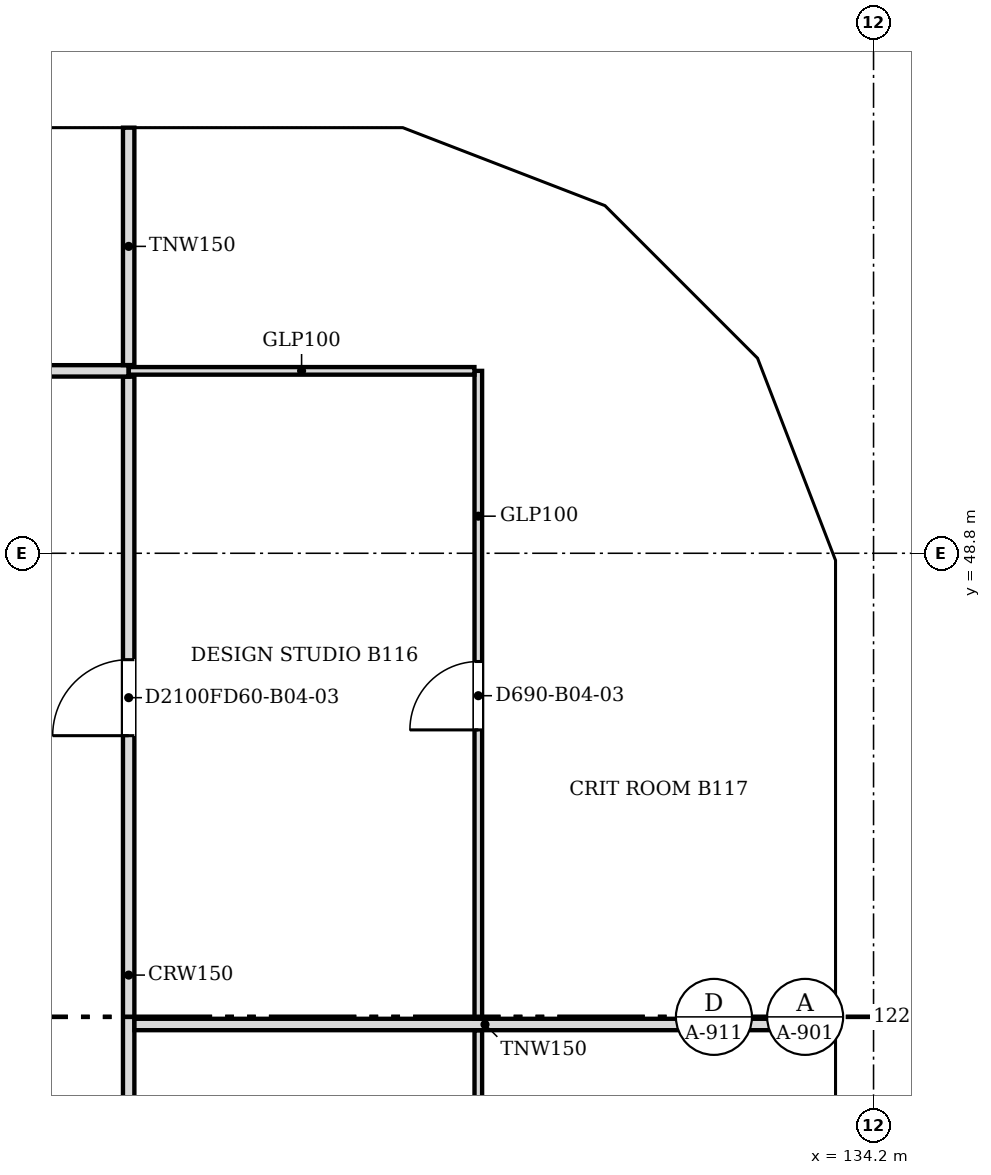
"""IFC4 building model, lengths in metres.
Left out: names, types, materials, properties, quantities, classifications, styles, units other than length and angle.
Written with IfcOpenShell. Run it as: python <this file> out.ifc"""

import sys

from ifc_helpers import new_model, si_unit, direction, frame, frame_2d, origin, place, context, subcontext, project, spatial, polyline, rectangle, outline, extrude, faceted_brep, source, transform, mapped, element, fill, save


model = new_model("IFC4")
c1 = context("Model", 3, precision=1e-05, world=origin(), true_north=direction((0.0, 1.0)))
c2 = subcontext(c1, "Body", "Model", "MODEL_VIEW")
j1 = project(units=[si_unit("LENGTHUNIT", "METRE"), si_unit("PLANEANGLEUNIT", "RADIAN")], contexts=[c1])
p1 = place(None, origin())
s1 = spatial("IfcSite", under=j1, at=p1, CompositionType="ELEMENT")
p2 = place(p1, origin())
s2 = spatial("IfcBuilding", under=s1, at=p2, CompositionType="ELEMENT")
p3 = place(p2, frame((0.0, 0.0, 37.2)))
s3 = spatial("IfcBuildingStorey", under=s2, at=p3, CompositionType="ELEMENT", Elevation=37.2)
m1 = source(origin(), c2, "Body", "SweptSolid", [
    extrude(outline(polyline([(3.05, 0.0), (6.1, 3.8), (3.05, 7.6), (0.0, 3.8), (3.05, 0.0)])), frame((0.0, 0.25, 0.0), z_axis=(0.0, -1.0, 0.0), x_axis=(1.0, 0.0, 0.0)), (0.0, 0.0, 1.0), 0.5),
])
p4 = place(p3, frame((133.95, 39.65, -3.8), z_axis=(0.0, 0.0, 1.0), x_axis=(0.0, 1.0, 0.0)))
e1 = element("IfcWall", 1, at=p4, inside=s3, PredefinedType="SOLIDWALL", context=c2, shape_type="MappedRepresentation", body=[
    mapped(m1, transform((0.0, 0.0, 0.0), scale=1.0)),
])
m2 = source(origin(), c2, "Body", "SweptSolid", [
    extrude(outline(polyline([(3.05, 0.399), (5.78, 3.8), (3.05, 7.201), (0.321, 3.8), (3.05, 0.399)])), frame((0.0, 0.26, 0.0), z_axis=(0.0, -1.0, 0.0), x_axis=(1.0, 0.0, 0.0)), (0.0, 0.0, 1.0), 0.52),
])
p5 = place(p4, origin())
e2 = element("IfcOpeningElement", 2, at=p5, cuts=e1, PredefinedType="OPENING", context=c2, shape_type="MappedRepresentation", body=[
    mapped(m2, transform((0.0, 0.0, 0.0), scale=1.0)),
])
m3 = source(origin(), c2, "Body", "Brep", [
    faceted_brep([(3.003, -0.25, 0.0), (3.05, -0.25, 0.06), (3.05, -0.25, 7.54), (3.003, -0.25, 7.6), (0.0, -0.25, 3.8), (0.0, 0.25, 3.8), (2.957, 0.25, 7.541), (2.957, 0.25, 0.059), (3.003, 0.0, 0.0), (3.003, 0.0, 7.6)], [[[0, 1, 2, 3, 4]], [[5, 6, 7]], [[1, 0, 8]], [[9, 3, 2]], [[6, 5, 4, 3, 9]], [[5, 7, 8, 0, 4]], [[1, 8, 7, 6, 9, 2]]]),
])
p6 = place(p3, frame((133.95, 45.75, -3.8), z_axis=(0.0, 0.0, 1.0), x_axis=(0.0, 1.0, 0.0)))
e3 = element("IfcWall", 3, at=p6, inside=s3, PredefinedType="SOLIDWALL", context=c2, shape_type="MappedRepresentation", body=[
    mapped(m3, transform((0.0, 0.0, 0.0), scale=1.0)),
])
m4 = source(origin(), c2, "Body", "SweptSolid", [
    extrude(outline(polyline([(2.803, 6.944), (0.319, 3.8), (2.803, 0.656), (2.803, 6.944)])), frame((0.0, 0.26, 0.0), z_axis=(0.0, -1.0, 0.0), x_axis=(1.0, 0.0, 0.0)), (0.0, 0.0, 1.0), 0.52),
])
p7 = place(p6, origin())
e4 = element("IfcOpeningElement", 4, at=p7, cuts=e3, PredefinedType="OPENING", context=c2, shape_type="MappedRepresentation", body=[
    mapped(m4, transform((0.0, 0.0, 0.0), scale=1.0)),
])
m5 = source(origin(), c2, "Body", "Brep", [
    faceted_brep([(0.047, -0.25, 0.0), (2.997, -0.25, 3.8), (0.047, -0.25, 7.6), (0.0, -0.25, 7.541), (0.0, -0.25, 0.059), (0.093, 0.25, 7.54), (2.944, 0.25, 3.868), (2.944, 0.25, 3.732), (0.093, 0.25, 0.06), (2.997, 0.0, 3.8), (0.047, 0.0, 0.0), (0.047, 0.0, 7.6)], [[[0, 1, 2, 3, 4]], [[5, 6, 7, 8]], [[8, 7, 9, 1, 0, 10]], [[6, 5, 11, 2, 1, 9]], [[3, 2, 11]], [[10, 0, 4]], [[8, 10, 4, 3, 11, 5]], [[9, 7, 6]]]),
])
p8 = place(p3, frame((133.967, 48.71, -3.8), z_axis=(0.0, 0.0, 1.0), x_axis=(-0.359901446078, 0.932990326376, 0.0)))
e5 = element("IfcWall", 5, at=p8, inside=s3, PredefinedType="SOLIDWALL", context=c2, shape_type="MappedRepresentation", body=[
    mapped(m5, transform((0.0, 0.0, 0.0), scale=1.0)),
])
m6 = source(origin(), c2, "Body", "SweptSolid", [
    extrude(outline(polyline([(0.247, 0.665), (2.681, 3.8), (0.247, 6.935), (0.247, 0.665)])), frame((0.0, 0.26, 0.0), z_axis=(0.0, -1.0, 0.0), x_axis=(1.0, 0.0, 0.0)), (0.0, 0.0, 1.0), 0.52),
])
p9 = place(p8, origin())
e6 = element("IfcOpeningElement", 6, at=p9, cuts=e5, PredefinedType="OPENING", context=c2, shape_type="MappedRepresentation", body=[
    mapped(m6, transform((0.0, 0.0, 0.0), scale=1.0)),
])
m7 = source(origin(), c2, "Body", "Brep", [
    faceted_brep([(2.944, -0.25, 0.0), (2.997, -0.25, 0.068), (2.997, -0.25, 7.532), (2.944, -0.25, 7.6), (0.0, -0.25, 3.8), (0.053, 0.25, 3.868), (2.891, 0.25, 7.532), (2.891, 0.25, 0.068), (0.053, 0.25, 3.732), (2.944, 0.0, 0.0), (2.944, 0.0, 7.6), (0.0, 0.0, 3.8)], [[[0, 1, 2, 3, 4]], [[5, 6, 7, 8]], [[1, 0, 9]], [[10, 3, 2]], [[6, 5, 11, 4, 3, 10]], [[8, 7, 9, 0, 4, 11]], [[8, 11, 5]], [[1, 9, 7, 6, 10, 2]]]),
])
p10 = place(p3, frame((132.888, 51.506, -3.8), z_axis=(0.0, 0.0, 1.0), x_axis=(-0.707147509625, 0.707066050402, 0.0)))
e7 = element("IfcWall", 7, at=p10, inside=s3, PredefinedType="SOLIDWALL", context=c2, shape_type="MappedRepresentation", body=[
    mapped(m7, transform((0.0, 0.0, 0.0), scale=1.0)),
])
m8 = source(origin(), c2, "Body", "SweptSolid", [
    extrude(outline(polyline([(2.744, 6.934), (0.316, 3.8), (2.744, 0.667), (2.744, 6.934)])), frame((0.0, 0.26, 0.0), z_axis=(0.0, -1.0, 0.0), x_axis=(1.0, 0.0, 0.0)), (0.0, 0.0, 1.0), 0.52),
])
p11 = place(p10, origin())
e8 = element("IfcOpeningElement", 8, at=p11, cuts=e7, PredefinedType="OPENING", context=c2, shape_type="MappedRepresentation", body=[
    mapped(m8, transform((0.0, 0.0, 0.0), scale=1.0)),
])
m9 = source(origin(), c2, "Body", "Brep", [
    faceted_brep([(0.053, -0.25, 0.0), (3.003, -0.25, 3.8), (0.053, -0.25, 7.6), (0.0, -0.25, 7.532), (0.0, -0.25, 0.068), (0.106, 0.25, 7.532), (2.957, 0.25, 3.86), (2.957, 0.25, 3.74), (0.106, 0.25, 0.068), (3.003, 0.0, 3.8), (0.053, 0.0, 0.0), (0.053, 0.0, 7.6)], [[[0, 1, 2, 3, 4]], [[5, 6, 7, 8]], [[8, 7, 9, 1, 0, 10]], [[6, 5, 11, 2, 1, 9]], [[3, 2, 11]], [[10, 0, 4]], [[8, 10, 4, 3, 11, 5]], [[9, 7, 6]]]),
])
p12 = place(p3, frame((130.856, 53.569, -3.8), z_axis=(0.0, 0.0, 1.0), x_axis=(-0.933007896601, 0.359855894603, 0.0)))
e9 = element("IfcWall", 9, at=p12, inside=s3, PredefinedType="SOLIDWALL", context=c2, shape_type="MappedRepresentation", body=[
    mapped(m9, transform((0.0, 0.0, 0.0), scale=1.0)),
])
m10 = source(origin(), c2, "Body", "SweptSolid", [
    extrude(outline(polyline([(0.253, 0.665), (2.687, 3.8), (0.253, 6.935), (0.253, 0.665)])), frame((0.0, 0.26, 0.0), z_axis=(0.0, -1.0, 0.0), x_axis=(1.0, 0.0, 0.0)), (0.0, 0.0, 1.0), 0.52),
])
p13 = place(p12, origin())
e10 = element("IfcOpeningElement", 10, at=p13, cuts=e9, PredefinedType="OPENING", context=c2, shape_type="MappedRepresentation", body=[
    mapped(m10, transform((0.0, 0.0, 0.0), scale=1.0)),
])
m11 = source(origin(), c2, "Body", "Brep", [
    faceted_brep([(3.003, -0.25, 0.0), (6.053, -0.25, 3.8), (3.003, -0.25, 7.6), (0.0, -0.25, 3.8), (0.047, 0.25, 3.859), (3.003, 0.25, 7.6), (6.053, 0.25, 3.8), (3.003, 0.25, 0.0), (0.047, 0.25, 3.741), (0.0, 0.0, 3.8)], [[[0, 1, 2, 3]], [[4, 5, 6, 7, 8]], [[7, 6, 1, 0]], [[6, 5, 2, 1]], [[5, 4, 9, 3, 2]], [[8, 7, 0, 3, 9]], [[8, 9, 4]]]),
])
p14 = place(p3, frame((128.053, 54.65, -3.8), z_axis=(0.0, 0.0, 1.0), x_axis=(-1.0, 0.0, 0.0)))
e11 = element("IfcWall", 11, at=p14, inside=s3, PredefinedType="SOLIDWALL", context=c2, shape_type="MappedRepresentation", body=[
    mapped(m11, transform((0.0, 0.0, 0.0), scale=1.0)),
])
m12 = source(origin(), c2, "Body", "SweptSolid", [
    extrude(outline(polyline([(3.005, 0.401), (5.733, 3.8), (3.005, 7.199), (0.319, 3.8), (3.005, 0.401)])), frame((0.0, 0.26, 0.0), z_axis=(0.0, -1.0, 0.0), x_axis=(1.0, 0.0, 0.0)), (0.0, 0.0, 1.0), 0.52),
])
p15 = place(p14, origin())
e12 = element("IfcOpeningElement", 12, at=p15, cuts=e11, PredefinedType="OPENING", context=c2, shape_type="MappedRepresentation", body=[
    mapped(m12, transform((0.0, 0.0, 0.0), scale=1.0)),
])
p16 = place(p2, frame((0.0, 0.0, 41.0)))
s4 = spatial("IfcBuildingStorey", under=s2, at=p16, CompositionType="ELEMENT", Elevation=41.0)
m13 = source(origin(), c2, "Body", "Brep", [
    faceted_brep([(3.05, -0.25, 0.0), (6.1, -0.25, 3.8), (6.1, -0.25, 3.8), (3.05, -0.25, 7.6), (0.0, -0.25, 3.8), (0.0, 0.25, 3.8), (3.05, 0.25, 7.6), (6.1, 0.25, 3.8), (6.1, 0.25, 3.8), (3.05, 0.25, 0.0)], [[[0, 1, 2, 3, 4]], [[5, 6, 7, 8, 9]], [[9, 8, 1, 0]], [[7, 6, 3, 2]], [[6, 5, 4, 3]], [[5, 9, 0, 4]], [[1, 8, 7, 2]]]),
])
p17 = place(p16, frame((133.95, 36.6, -3.8), z_axis=(0.0, 0.0, 1.0), x_axis=(0.0, 1.0, 0.0)))
e13 = element("IfcWall", 13, at=p17, inside=s4, PredefinedType="SOLIDWALL", context=c2, shape_type="MappedRepresentation", body=[
    mapped(m13, transform((0.0, 0.0, 0.0), scale=1.0)),
])
p18 = place(p17, origin())
e14 = element("IfcOpeningElement", 14, at=p18, cuts=e13, PredefinedType="OPENING", context=c2, shape_type="MappedRepresentation", body=[
    mapped(m2, transform((0.0, 0.0, 0.0), scale=1.0)),
])
m14 = source(origin(), c2, "Body", "Brep", [
    faceted_brep([(3.05, -0.25, 0.0), (6.053, -0.25, 3.8), (3.05, -0.25, 7.6), (0.0, -0.25, 3.8), (0.0, 0.25, 3.8), (3.05, 0.25, 7.6), (6.007, 0.25, 3.859), (6.007, 0.25, 3.741), (3.05, 0.25, 0.0), (6.053, 0.0, 3.8)], [[[0, 1, 2, 3]], [[4, 5, 6, 7, 8]], [[8, 7, 9, 1, 0]], [[6, 5, 2, 1, 9]], [[5, 4, 3, 2]], [[4, 8, 0, 3]], [[9, 7, 6]]]),
])
p19 = place(p16, frame((133.95, 42.7, -3.8), z_axis=(0.0, 0.0, 1.0), x_axis=(0.0, 1.0, 0.0)))
e15 = element("IfcWall", 15, at=p19, inside=s4, PredefinedType="SOLIDWALL", context=c2, shape_type="MappedRepresentation", body=[
    mapped(m14, transform((0.0, 0.0, 0.0), scale=1.0)),
])
m15 = source(origin(), c2, "Body", "SweptSolid", [
    extrude(outline(polyline([(3.049, 0.401), (5.735, 3.8), (3.049, 7.199), (0.321, 3.8), (3.049, 0.401)])), frame((0.0, 0.26, 0.0), z_axis=(0.0, -1.0, 0.0), x_axis=(1.0, 0.0, 0.0)), (0.0, 0.0, 1.0), 0.52),
])
p20 = place(p19, origin())
e16 = element("IfcOpeningElement", 16, at=p20, cuts=e15, PredefinedType="OPENING", context=c2, shape_type="MappedRepresentation", body=[
    mapped(m15, transform((0.0, 0.0, 0.0), scale=1.0)),
])
m16 = source(origin(), c2, "Body", "Brep", [
    faceted_brep([(2.95, -0.25, 0.0), (3.003, -0.25, 0.068), (3.003, -0.25, 7.532), (2.95, -0.25, 7.6), (0.0, -0.25, 3.8), (0.047, 0.25, 3.86), (2.898, 0.25, 7.532), (2.898, 0.25, 0.068), (0.047, 0.25, 3.74), (2.95, 0.0, 0.0), (2.95, 0.0, 7.6), (0.0, 0.0, 3.8)], [[[0, 1, 2, 3, 4]], [[5, 6, 7, 8]], [[1, 0, 9]], [[10, 3, 2]], [[6, 5, 11, 4, 3, 10]], [[8, 7, 9, 0, 4, 11]], [[8, 11, 5]], [[1, 9, 7, 6, 10, 2]]]),
])
p21 = place(p16, frame((133.95, 48.753, -3.8), z_axis=(0.0, 0.0, 1.0), x_axis=(-0.359855894603, 0.933007896601, 0.0)))
e17 = element("IfcWall", 17, at=p21, inside=s4, PredefinedType="SOLIDWALL", context=c2, shape_type="MappedRepresentation", body=[
    mapped(m16, transform((0.0, 0.0, 0.0), scale=1.0)),
])
m17 = source(origin(), c2, "Body", "SweptSolid", [
    extrude(outline(polyline([(2.75, 6.935), (0.316, 3.8), (2.75, 0.665), (2.75, 6.935)])), frame((0.0, 0.26, 0.0), z_axis=(0.0, -1.0, 0.0), x_axis=(1.0, 0.0, 0.0)), (0.0, 0.0, 1.0), 0.52),
])
p22 = place(p21, origin())
e18 = element("IfcOpeningElement", 18, at=p22, cuts=e17, PredefinedType="OPENING", context=c2, shape_type="MappedRepresentation", body=[
    mapped(m17, transform((0.0, 0.0, 0.0), scale=1.0)),
])
m18 = source(origin(), c2, "Body", "Brep", [
    faceted_brep([(0.053, -0.25, 0.0), (2.997, -0.25, 3.8), (0.053, -0.25, 7.6), (0.0, -0.25, 7.532), (0.0, -0.25, 0.068), (0.106, 0.25, 7.532), (2.944, 0.25, 3.868), (2.944, 0.25, 3.732), (0.106, 0.25, 0.068), (2.997, 0.0, 3.8), (0.053, 0.0, 0.0), (0.053, 0.0, 7.6)], [[[0, 1, 2, 3, 4]], [[5, 6, 7, 8]], [[8, 7, 9, 1, 0, 10]], [[6, 5, 11, 2, 1, 9]], [[3, 2, 11]], [[10, 0, 4]], [[8, 10, 4, 3, 11, 5]], [[9, 7, 6]]]),
])
p23 = place(p16, frame((132.926, 51.469, -3.8), z_axis=(0.0, 0.0, 1.0), x_axis=(-0.707066050402, 0.707147509625, 0.0)))
e19 = element("IfcWall", 19, at=p23, inside=s4, PredefinedType="SOLIDWALL", context=c2, shape_type="MappedRepresentation", body=[
    mapped(m18, transform((0.0, 0.0, 0.0), scale=1.0)),
])
m19 = source(origin(), c2, "Body", "SweptSolid", [
    extrude(outline(polyline([(0.253, 0.666), (2.681, 3.8), (0.253, 6.934), (0.253, 0.666)])), frame((0.0, 0.26, 0.0), z_axis=(0.0, -1.0, 0.0), x_axis=(1.0, 0.0, 0.0)), (0.0, 0.0, 1.0), 0.52),
])
p24 = place(p23, origin())
e20 = element("IfcOpeningElement", 20, at=p24, cuts=e19, PredefinedType="OPENING", context=c2, shape_type="MappedRepresentation", body=[
    mapped(m19, transform((0.0, 0.0, 0.0), scale=1.0)),
])
m20 = source(origin(), c2, "Body", "Brep", [
    faceted_brep([(2.95, -0.25, 0.0), (2.997, -0.25, 0.059), (2.997, -0.25, 7.541), (2.95, -0.25, 7.6), (0.0, -0.25, 3.8), (0.053, 0.25, 3.868), (2.904, 0.25, 7.54), (2.904, 0.25, 0.06), (0.053, 0.25, 3.732), (2.95, 0.0, 0.0), (2.95, 0.0, 7.6), (0.0, 0.0, 3.8)], [[[0, 1, 2, 3, 4]], [[5, 6, 7, 8]], [[1, 0, 9]], [[10, 3, 2]], [[6, 5, 11, 4, 3, 10]], [[8, 7, 9, 0, 4, 11]], [[8, 11, 5]], [[1, 9, 7, 6, 10, 2]]]),
])
p25 = place(p16, frame((130.806, 53.588, -3.8), z_axis=(0.0, 0.0, 1.0), x_axis=(-0.932990326376, 0.359901446078, 0.0)))
e21 = element("IfcWall", 21, at=p25, inside=s4, PredefinedType="SOLIDWALL", context=c2, shape_type="MappedRepresentation", body=[
    mapped(m20, transform((0.0, 0.0, 0.0), scale=1.0)),
])
p26 = place(p25, origin())
e22 = element("IfcOpeningElement", 22, at=p26, cuts=e21, PredefinedType="OPENING", context=c2, shape_type="MappedRepresentation", body=[
    mapped(m17, transform((0.0, 0.0, 0.0), scale=1.0)),
])
m21 = source(origin(), c2, "Body", "Brep", [
    faceted_brep([(0.047, -0.25, 0.0), (3.05, -0.25, 3.8), (0.047, -0.25, 7.6), (0.0, -0.25, 7.54), (0.0, -0.25, 0.06), (0.093, 0.25, 7.541), (3.05, 0.25, 3.8), (0.093, 0.25, 0.059), (0.047, 0.0, 0.0), (0.047, 0.0, 7.6)], [[[0, 1, 2, 3, 4]], [[5, 6, 7]], [[7, 6, 1, 0, 8]], [[6, 5, 9, 2, 1]], [[3, 2, 9]], [[8, 0, 4]], [[7, 8, 4, 3, 9, 5]]]),
])
p27 = place(p16, frame((128.1, 54.65, -3.8), z_axis=(0.0, 0.0, 1.0), x_axis=(-1.0, 0.0, 0.0)))
e23 = element("IfcWall", 23, at=p27, inside=s4, PredefinedType="SOLIDWALL", context=c2, shape_type="MappedRepresentation", body=[
    mapped(m21, transform((0.0, 0.0, 0.0), scale=1.0)),
])
m22 = source(origin(), c2, "Body", "SweptSolid", [
    extrude(outline(polyline([(0.247, 0.656), (2.731, 3.8), (0.247, 6.944), (0.247, 0.656)])), frame((0.0, 0.26, 0.0), z_axis=(0.0, -1.0, 0.0), x_axis=(1.0, 0.0, 0.0)), (0.0, 0.0, 1.0), 0.52),
])
p28 = place(p27, origin())
e24 = element("IfcOpeningElement", 24, at=p28, cuts=e23, PredefinedType="OPENING", context=c2, shape_type="MappedRepresentation", body=[
    mapped(m22, transform((0.0, 0.0, 0.0), scale=1.0)),
])
p29 = place(p16, frame((125.05, 54.65, -3.8), z_axis=(0.0, 0.0, 1.0), x_axis=(-1.0, 0.0, 0.0)))
e25 = element("IfcWall", 25, at=p29, inside=s4, PredefinedType="SOLIDWALL", context=c2, shape_type="MappedRepresentation", body=[
    mapped(m1, transform((0.0, 0.0, 0.0), scale=1.0)),
])
p30 = place(p29, origin())
e26 = element("IfcOpeningElement", 26, at=p30, cuts=e25, PredefinedType="OPENING", context=c2, shape_type="MappedRepresentation", body=[
    mapped(m2, transform((0.0, 0.0, 0.0), scale=1.0)),
])
p31 = place(p3, frame((124.4, 51.124, 0.0), z_axis=(0.0, 0.0, 1.0), x_axis=(0.0, -1.0, 0.0)))
e27 = element("IfcWall", 27, at=p31, inside=s3, PredefinedType="PARTITIONING", context=c2, shape_type="SweptSolid", body=[
    extrude(rectangle(XDim=14.524, YDim=0.15, at=frame_2d((7.262, 0.0))), origin(), (0.0, 0.0, 1.0), 3.067),
])
m23 = source(origin(), c2, "Body", "SweptSolid", [
    extrude(rectangle(XDim=1.0, YDim=2.1, at=frame_2d((0.5, 1.05))), frame((0.0, 0.085, 0.0), z_axis=(0.0, -1.0, 0.0), x_axis=(1.0, 0.0, 0.0)), (0.0, 0.0, 1.0), 0.17),
])
p32 = place(p31, frame((3.724, 0.0, 0.0)))
e28 = element("IfcOpeningElement", 28, at=p32, cuts=e27, PredefinedType="OPENING", context=c2, shape_type="MappedRepresentation", body=[
    mapped(m23, transform((0.0, 0.0, 0.0), scale=1.0)),
])
p33 = place(p31, frame((11.024, 0.0, 0.0)))
e29 = element("IfcOpeningElement", 29, at=p33, cuts=e27, PredefinedType="OPENING", context=c2, shape_type="MappedRepresentation", body=[
    mapped(m23, transform((0.0, 0.0, 0.0), scale=1.0)),
])
p34 = place(p3, frame((129.0, 42.524, 0.0), z_axis=(0.0, 0.0, 1.0), x_axis=(0.0, -1.0, 0.0)))
e30 = element("IfcWall", 30, at=p34, inside=s3, PredefinedType="PARTITIONING", context=c2, shape_type="SweptSolid", body=[
    extrude(rectangle(XDim=5.848, YDim=0.1, at=frame_2d((2.924, 0.0))), origin(), (0.0, 0.0, 1.0), 3.067),
])
m24 = source(origin(), c2, "Body", "SweptSolid", [
    extrude(rectangle(XDim=0.9, YDim=2.1, at=frame_2d((0.45, 1.05))), frame((0.0, 0.06, 0.0), z_axis=(0.0, -1.0, 0.0), x_axis=(1.0, 0.0, 0.0)), (0.0, 0.0, 1.0), 0.12),
])
p35 = place(p34, frame((2.448, 0.0, 0.0)))
e31 = element("IfcOpeningElement", 31, at=p35, cuts=e30, PredefinedType="OPENING", context=c2, shape_type="MappedRepresentation", body=[
    mapped(m24, transform((0.0, 0.0, 0.0), scale=1.0)),
])
p36 = place(p3, frame((124.476, 42.6, 0.0), z_axis=(0.0, 0.0, 1.0), x_axis=(1.0, 0.0, 0.0)))
e32 = element("IfcWall", 32, at=p36, inside=s3, PredefinedType="PARTITIONING", context=c2, shape_type="SweptSolid", body=[
    extrude(rectangle(XDim=9.224, YDim=0.15, at=frame_2d((4.612, 0.0))), origin(), (0.0, 0.0, 1.0), 3.067),
])
p37 = place(p3, frame((129.0, 51.2, 0.0), z_axis=(0.0, 0.0, 1.0), x_axis=(0.0, -1.0, 0.0)))
e33 = element("IfcWall", 33, at=p37, inside=s3, PredefinedType="PARTITIONING", context=c2, shape_type="SweptSolid", body=[
    extrude(rectangle(XDim=8.524, YDim=0.1, at=frame_2d((4.262, 0.0))), origin(), (0.0, 0.0, 1.0), 3.067),
])
p38 = place(p37, frame((3.824, 0.0, 0.0)))
e34 = element("IfcOpeningElement", 34, at=p38, cuts=e33, PredefinedType="OPENING", context=c2, shape_type="MappedRepresentation", body=[
    mapped(m24, transform((0.0, 0.0, 0.0), scale=1.0)),
])
p39 = place(p3, frame((108.5, 51.2, 0.0), z_axis=(0.0, 0.0, 1.0), x_axis=(1.0, 0.0, 0.0)))
e35 = element("IfcWall", 35, at=p39, inside=s3, PredefinedType="PARTITIONING", context=c2, shape_type="SweptSolid", body=[
    extrude(rectangle(XDim=15.9, YDim=0.15, at=frame_2d((7.95, 0.0))), origin(), (0.0, 0.0, 1.0), 3.067),
])
m25 = source(origin(), c2, "Body", "SweptSolid", [
    extrude(rectangle(XDim=0.9, YDim=2.1, at=frame_2d((0.45, 1.05))), frame((0.0, 0.085, 0.0), z_axis=(0.0, -1.0, 0.0), x_axis=(1.0, 0.0, 0.0)), (0.0, 0.0, 1.0), 0.17),
])
p40 = place(p39, frame((7.5, 0.0, 0.0)))
e36 = element("IfcOpeningElement", 36, at=p40, cuts=e35, PredefinedType="OPENING", context=c2, shape_type="MappedRepresentation", body=[
    mapped(m25, transform((0.0, 0.0, 0.0), scale=1.0)),
])
p41 = place(p3, frame((124.401, 51.2, 0.0), z_axis=(0.0, 0.0, 1.0), x_axis=(1.0, 0.0, 0.0)))
e37 = element("IfcWall", 37, at=p41, inside=s3, PredefinedType="PARTITIONING", context=c2, shape_type="SweptSolid", body=[
    extrude(rectangle(XDim=4.548, YDim=0.1, at=frame_2d((2.274, 0.0))), origin(), (0.0, 0.0, 1.0), 3.067),
])
p42 = place(p3, frame((124.4, 51.276, 0.0), z_axis=(0.0, 0.0, 1.0), x_axis=(0.0, 1.0, 0.0)))
e38 = element("IfcWall", 38, at=p42, inside=s3, PredefinedType="PARTITIONING", context=c2, shape_type="SweptSolid", body=[
    extrude(rectangle(XDim=3.124, YDim=0.15, at=frame_2d((1.562, 0.0))), origin(), (0.0, 0.0, 1.0), 3.067),
])
m26 = source(origin(), c2, "Body", "SweptSolid", [
    extrude(rectangle(XDim=1.0, YDim=2.1, at=frame_2d((0.5, 1.05))), frame((0.0, 0.025, 0.0), z_axis=(0.0, -1.0, 0.0), x_axis=(1.0, 0.0, 0.0)), (0.0, 0.0, 1.0), 0.05),
])
p43 = place(p32, origin())
e39 = element("IfcDoor", 39, at=p43, inside=s3, OperationType="SINGLE_SWING_RIGHT", PredefinedType="DOOR", context=c2, shape_type="MappedRepresentation", body=[
    mapped(m26, transform((0.0, 0.0, 0.0), scale=1.0)),
])
fill(e28, e39)
m27 = source(origin(), c2, "Body", "SweptSolid", [
    extrude(rectangle(XDim=0.9, YDim=2.1, at=frame_2d((0.45, 1.05))), frame((0.0, 0.025, 0.0), z_axis=(0.0, -1.0, 0.0), x_axis=(1.0, 0.0, 0.0)), (0.0, 0.0, 1.0), 0.05),
])
p44 = place(p38, origin())
e40 = element("IfcDoor", 40, at=p44, inside=s3, OperationType="SINGLE_SWING_RIGHT", PredefinedType="DOOR", context=c2, shape_type="MappedRepresentation", body=[
    mapped(m27, transform((0.0, 0.0, 0.0), scale=1.0)),
])
fill(e34, e40)
save(model, sys.argv[1])
